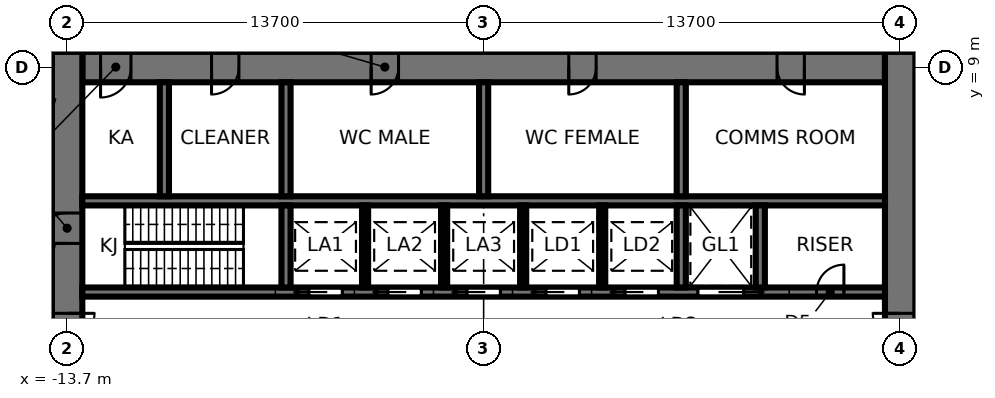
"""IFC4 building model, lengths in metres.
Left out: names, types, materials, properties, quantities, classifications, styles, units other than length and angle.
Written with IfcOpenShell. Run it as: python <this file> out.ifc"""

import sys

from ifc_helpers import new_model, si_unit, direction, frame, frame_2d, origin, place, context, subcontext, project, spatial, rectangle, extrude, element, fill, save


model = new_model("IFC4")
c1 = context("Model", 3, precision=1e-05, world=origin(), true_north=direction((0.0, 1.0)))
c2 = subcontext(c1, "Body", "Model", "MODEL_VIEW")
j1 = project(units=[si_unit("LENGTHUNIT", "METRE"), si_unit("PLANEANGLEUNIT", "RADIAN")], contexts=[c1])
p1 = place(None, origin())
s1 = spatial("IfcSite", under=j1, at=p1, CompositionType="ELEMENT")
p2 = place(p1, origin())
s2 = spatial("IfcBuilding", under=s1, at=p2, CompositionType="ELEMENT")
p3 = place(p2, origin())
s3 = spatial("IfcBuildingStorey", under=s2, at=p3, CompositionType="ELEMENT", Elevation=0.0)
p4 = place(p3, frame((13.2, 9.0, 0.0), z_axis=(0.0, 0.0, 1.0), x_axis=(-1.0, 0.0, 0.0)))
e1 = element("IfcWall", 1, at=p4, inside=s3, PredefinedType="SHEAR", context=c2, shape_type="SweptSolid", body=[
    extrude(rectangle(XDim=26.4, YDim=1.0, at=frame_2d((13.2, 0.0))), origin(), (0.0, 0.0, 1.0), 5.6),
])
p5 = place(p4, frame((2.65, 0.0, 0.0)))
e2 = element("IfcOpeningElement", 2, at=p5, cuts=e1, PredefinedType="OPENING", context=c2, shape_type="SweptSolid", body=[
    extrude(rectangle(XDim=0.9, YDim=2.1, at=frame_2d((0.45, 1.05))), frame((0.0, 0.51, 0.0), z_axis=(0.0, -1.0, 0.0), x_axis=(1.0, 0.0, 0.0)), (0.0, 0.0, 1.0), 1.02),
])
p6 = place(p4, frame((9.5, 0.0, 0.0)))
e3 = element("IfcOpeningElement", 3, at=p6, cuts=e1, PredefinedType="OPENING", context=c2, shape_type="SweptSolid", body=[
    extrude(rectangle(XDim=0.9, YDim=2.1, at=frame_2d((0.45, 1.05))), frame((0.0, 0.51, 0.0), z_axis=(0.0, -1.0, 0.0), x_axis=(1.0, 0.0, 0.0)), (0.0, 0.0, 1.0), 1.02),
])
p7 = place(p4, frame((16.0, 0.0, 0.0)))
e4 = element("IfcOpeningElement", 4, at=p7, cuts=e1, PredefinedType="OPENING", context=c2, shape_type="SweptSolid", body=[
    extrude(rectangle(XDim=0.9, YDim=2.1, at=frame_2d((0.45, 1.05))), frame((0.0, 0.51, 0.0), z_axis=(0.0, -1.0, 0.0), x_axis=(1.0, 0.0, 0.0)), (0.0, 0.0, 1.0), 1.02),
])
p8 = place(p4, frame((21.25, 0.0, 0.0)))
e5 = element("IfcOpeningElement", 5, at=p8, cuts=e1, PredefinedType="OPENING", context=c2, shape_type="SweptSolid", body=[
    extrude(rectangle(XDim=0.9, YDim=2.1, at=frame_2d((0.45, 1.05))), frame((0.0, 0.51, 0.0), z_axis=(0.0, -1.0, 0.0), x_axis=(1.0, 0.0, 0.0)), (0.0, 0.0, 1.0), 1.02),
])
p9 = place(p4, frame((24.8, 0.0, 0.0)))
e6 = element("IfcOpeningElement", 6, at=p9, cuts=e1, PredefinedType="OPENING", context=c2, shape_type="SweptSolid", body=[
    extrude(rectangle(XDim=1.0, YDim=2.1, at=frame_2d((0.5, 1.05))), frame((0.0, 0.51, 0.0), z_axis=(0.0, -1.0, 0.0), x_axis=(1.0, 0.0, 0.0)), (0.0, 0.0, 1.0), 1.02),
])
p10 = place(p3, frame((13.7, -9.5, 0.0), z_axis=(0.0, 0.0, 1.0), x_axis=(0.0, 1.0, 0.0)))
e7 = element("IfcWall", 7, at=p10, inside=s3, PredefinedType="SHEAR", context=c2, shape_type="SweptSolid", body=[
    extrude(rectangle(XDim=19.0, YDim=1.0, at=frame_2d((9.5, 0.0))), origin(), (0.0, 0.0, 1.0), 5.6),
])
p11 = place(p10, frame((8.6, 0.0, 0.0)))
e8 = element("IfcOpeningElement", 8, at=p11, cuts=e7, PredefinedType="OPENING", context=c2, shape_type="SweptSolid", body=[
    extrude(rectangle(XDim=1.8, YDim=2.4, at=frame_2d((0.9, 1.2))), frame((0.0, 0.51, 0.0), z_axis=(0.0, -1.0, 0.0), x_axis=(1.0, 0.0, 0.0)), (0.0, 0.0, 1.0), 1.02),
])
p12 = place(p10, frame((5.6, 0.0, 0.0)))
e9 = element("IfcOpeningElement", 9, at=p12, cuts=e7, PredefinedType="OPENING", context=c2, shape_type="SweptSolid", body=[
    extrude(rectangle(XDim=1.0, YDim=2.1, at=frame_2d((0.5, 1.05))), frame((0.0, 0.51, 0.0), z_axis=(0.0, -1.0, 0.0), x_axis=(1.0, 0.0, 0.0)), (0.0, 0.0, 1.0), 1.02),
])
p13 = place(p3, frame((-13.7, 9.5, 0.0), z_axis=(0.0, 0.0, 1.0), x_axis=(0.0, -1.0, 0.0)))
e10 = element("IfcWall", 10, at=p13, inside=s3, PredefinedType="SHEAR", context=c2, shape_type="SweptSolid", body=[
    extrude(rectangle(XDim=19.0, YDim=1.0, at=frame_2d((9.5, 0.0))), origin(), (0.0, 0.0, 1.0), 5.6),
])
p14 = place(p13, frame((8.6, 0.0, 0.0)))
e11 = element("IfcOpeningElement", 11, at=p14, cuts=e10, PredefinedType="OPENING", context=c2, shape_type="SweptSolid", body=[
    extrude(rectangle(XDim=1.8, YDim=2.4, at=frame_2d((0.9, 1.2))), frame((0.0, 0.51, 0.0), z_axis=(0.0, -1.0, 0.0), x_axis=(1.0, 0.0, 0.0)), (0.0, 0.0, 1.0), 1.02),
])
p15 = place(p13, frame((5.3, 0.0, 0.0)))
e12 = element("IfcOpeningElement", 12, at=p15, cuts=e10, PredefinedType="OPENING", context=c2, shape_type="SweptSolid", body=[
    extrude(rectangle(XDim=1.0, YDim=2.1, at=frame_2d((0.5, 1.05))), frame((0.0, 0.51, 0.0), z_axis=(0.0, -1.0, 0.0), x_axis=(1.0, 0.0, 0.0)), (0.0, 0.0, 1.0), 1.02),
])
p16 = place(p3, frame((-13.2, 1.6, 0.0), z_axis=(0.0, 0.0, 1.0), x_axis=(1.0, 0.0, 0.0)))
e13 = element("IfcWall", 13, at=p16, inside=s3, PredefinedType="SHEAR", context=c2, shape_type="SweptSolid", body=[
    extrude(rectangle(XDim=26.4, YDim=0.3, at=frame_2d((13.2, 0.0))), origin(), (0.0, 0.0, 1.0), 5.6),
])
p17 = place(p16, frame((20.25, 0.0, 0.0)))
e14 = element("IfcOpeningElement", 14, at=p17, cuts=e13, PredefinedType="OPENING", context=c2, shape_type="SweptSolid", body=[
    extrude(rectangle(XDim=1.5, YDim=2.4, at=frame_2d((0.75, 1.2))), frame((0.0, 0.16, 0.0), z_axis=(0.0, -1.0, 0.0), x_axis=(1.0, 0.0, 0.0)), (0.0, 0.0, 1.0), 0.32),
])
p18 = place(p16, frame((7.45, 0.0, 0.0)))
e15 = element("IfcOpeningElement", 15, at=p18, cuts=e13, PredefinedType="OPENING", context=c2, shape_type="SweptSolid", body=[
    extrude(rectangle(XDim=1.1, YDim=2.3, at=frame_2d((0.55, 1.15))), frame((0.0, 0.16, 0.0), z_axis=(0.0, -1.0, 0.0), x_axis=(1.0, 0.0, 0.0)), (0.0, 0.0, 1.0), 0.32),
])
p19 = place(p16, frame((10.05, 0.0, 0.0)))
e16 = element("IfcOpeningElement", 16, at=p19, cuts=e13, PredefinedType="OPENING", context=c2, shape_type="SweptSolid", body=[
    extrude(rectangle(XDim=1.1, YDim=2.3, at=frame_2d((0.55, 1.15))), frame((0.0, 0.16, 0.0), z_axis=(0.0, -1.0, 0.0), x_axis=(1.0, 0.0, 0.0)), (0.0, 0.0, 1.0), 0.32),
])
p20 = place(p16, frame((12.65, 0.0, 0.0)))
e17 = element("IfcOpeningElement", 17, at=p20, cuts=e13, PredefinedType="OPENING", context=c2, shape_type="SweptSolid", body=[
    extrude(rectangle(XDim=1.1, YDim=2.3, at=frame_2d((0.55, 1.15))), frame((0.0, 0.16, 0.0), z_axis=(0.0, -1.0, 0.0), x_axis=(1.0, 0.0, 0.0)), (0.0, 0.0, 1.0), 0.32),
])
p21 = place(p16, frame((15.25, 0.0, 0.0)))
e18 = element("IfcOpeningElement", 18, at=p21, cuts=e13, PredefinedType="OPENING", context=c2, shape_type="SweptSolid", body=[
    extrude(rectangle(XDim=1.1, YDim=2.3, at=frame_2d((0.55, 1.15))), frame((0.0, 0.16, 0.0), z_axis=(0.0, -1.0, 0.0), x_axis=(1.0, 0.0, 0.0)), (0.0, 0.0, 1.0), 0.32),
])
p22 = place(p16, frame((17.85, 0.0, 0.0)))
e19 = element("IfcOpeningElement", 19, at=p22, cuts=e13, PredefinedType="OPENING", context=c2, shape_type="SweptSolid", body=[
    extrude(rectangle(XDim=1.1, YDim=2.3, at=frame_2d((0.55, 1.15))), frame((0.0, 0.16, 0.0), z_axis=(0.0, -1.0, 0.0), x_axis=(1.0, 0.0, 0.0)), (0.0, 0.0, 1.0), 0.32),
])
p23 = place(p16, frame((24.15, 0.0, 0.0)))
e20 = element("IfcOpeningElement", 20, at=p23, cuts=e13, PredefinedType="OPENING", context=c2, shape_type="SweptSolid", body=[
    extrude(rectangle(XDim=0.9, YDim=2.1, at=frame_2d((0.45, 1.05))), frame((0.0, 0.16, 0.0), z_axis=(0.0, -1.0, 0.0), x_axis=(1.0, 0.0, 0.0)), (0.0, 0.0, 1.0), 0.32),
])
p24 = place(p3, frame((-13.2, 4.6, 0.0), z_axis=(0.0, 0.0, 1.0), x_axis=(1.0, 0.0, 0.0)))
e21 = element("IfcWall", 21, at=p24, inside=s3, PredefinedType="SHEAR", context=c2, shape_type="SweptSolid", body=[
    extrude(rectangle(XDim=26.4, YDim=0.3, at=frame_2d((13.2, 0.0))), origin(), (0.0, 0.0, 1.0), 5.6),
])
p25 = place(p3, frame((-6.5, 1.75, 0.0), z_axis=(0.0, 0.0, 1.0), x_axis=(0.0, 1.0, 0.0)))
e22 = element("IfcWall", 22, at=p25, inside=s3, PredefinedType="SHEAR", context=c2, shape_type="SweptSolid", body=[
    extrude(rectangle(XDim=2.7, YDim=0.3, at=frame_2d((1.35, 0.0))), origin(), (0.0, 0.0, 1.0), 5.6),
])
p26 = place(p3, frame((-6.5, 4.75, 0.0), z_axis=(0.0, 0.0, 1.0), x_axis=(0.0, 1.0, 0.0)))
e23 = element("IfcWall", 23, at=p26, inside=s3, PredefinedType="SHEAR", context=c2, shape_type="SweptSolid", body=[
    extrude(rectangle(XDim=3.75, YDim=0.3, at=frame_2d((1.875, 0.0))), origin(), (0.0, 0.0, 1.0), 5.6),
])
p27 = place(p3, frame((6.5, 1.75, 0.0), z_axis=(0.0, 0.0, 1.0), x_axis=(0.0, 1.0, 0.0)))
e24 = element("IfcWall", 24, at=p27, inside=s3, PredefinedType="SHEAR", context=c2, shape_type="SweptSolid", body=[
    extrude(rectangle(XDim=2.7, YDim=0.3, at=frame_2d((1.35, 0.0))), origin(), (0.0, 0.0, 1.0), 5.6),
])
p28 = place(p3, frame((6.5, 4.75, 0.0), z_axis=(0.0, 0.0, 1.0), x_axis=(0.0, 1.0, 0.0)))
e25 = element("IfcWall", 25, at=p28, inside=s3, PredefinedType="SHEAR", context=c2, shape_type="SweptSolid", body=[
    extrude(rectangle(XDim=3.75, YDim=0.3, at=frame_2d((1.875, 0.0))), origin(), (0.0, 0.0, 1.0), 5.6),
])
for number, where, z_axis, x_axis in (
    (26, (-3.9, 1.75, 0.0), (0.0, 0.0, 1.0), (0.0, 1.0, 0.0)),
    (27, (-1.3, 1.75, 0.0), (0.0, 0.0, 1.0), (0.0, 1.0, 0.0)),
    (28, (1.3, 1.75, 0.0), (0.0, 0.0, 1.0), (0.0, 1.0, 0.0)),
    (29, (3.9, 1.75, 0.0), (0.0, 0.0, 1.0), (0.0, 1.0, 0.0)),
):
    element("IfcWall", number, at=place(p3, frame(where, z_axis=z_axis, x_axis=x_axis)), inside=s3, PredefinedType="SHEAR", context=c2, shape_type="SweptSolid", body=[
        extrude(rectangle(XDim=2.7, YDim=0.2, at=frame_2d((1.35, 0.0))), origin(), (0.0, 0.0, 1.0), 5.6),
    ])
for number, where, z_axis, x_axis in (
    (30, (0.0, 4.75, 0.0), (0.0, 0.0, 1.0), (0.0, 1.0, 0.0)),
    (31, (-10.5, 4.75, 0.0), (0.0, 0.0, 1.0), (0.0, 1.0, 0.0)),
):
    element("IfcWall", number, at=place(p3, frame(where, z_axis=z_axis, x_axis=x_axis)), inside=s3, PredefinedType="SHEAR", context=c2, shape_type="SweptSolid", body=[
        extrude(rectangle(XDim=3.75, YDim=0.3, at=frame_2d((1.875, 0.0))), origin(), (0.0, 0.0, 1.0), 5.6),
    ])
p29 = place(p3, frame((9.1, 1.75, 0.0), z_axis=(0.0, 0.0, 1.0), x_axis=(0.0, 1.0, 0.0)))
e32 = element("IfcWall", 32, at=p29, inside=s3, PredefinedType="SHEAR", context=c2, shape_type="SweptSolid", body=[
    extrude(rectangle(XDim=2.7, YDim=0.3, at=frame_2d((1.35, 0.0))), origin(), (0.0, 0.0, 1.0), 5.6),
])
p30 = place(p3, frame((-14.2, 7.8, 0.0), z_axis=(0.0, 0.0, 1.0), x_axis=(-0.961010848489, 0.27651066722, 0.0)))
e33 = element("IfcWall", 33, at=p30, inside=s3, PredefinedType="SOLIDWALL", context=c2, shape_type="SweptSolid", body=[
    extrude(rectangle(XDim=9.763, YDim=0.19, at=frame_2d((4.882, 0.0))), origin(), (0.0, 0.0, 1.0), 5.4),
])
p31 = place(p3, frame((-42.512, 9.036, 0.0), z_axis=(0.0, 0.0, 1.0), x_axis=(0.978148538657, -0.207907278186, 0.0)))
e34 = element("IfcWall", 34, at=p31, inside=s3, PredefinedType="SOLIDWALL", context=c2, shape_type="SweptSolid", body=[
    extrude(rectangle(XDim=28.945, YDim=0.19, at=frame_2d((14.472, 0.0))), origin(), (0.0, 0.0, 1.0), 5.4),
])
p32 = place(p31, frame((8.116, 0.0, 0.0)))
e35 = element("IfcOpeningElement", 35, at=p32, cuts=e34, PredefinedType="OPENING", context=c2, shape_type="SweptSolid", body=[
    extrude(rectangle(XDim=1.0, YDim=2.1, at=frame_2d((0.5, 1.05))), frame((0.0, 0.105, 0.0), z_axis=(0.0, -1.0, 0.0), x_axis=(1.0, 0.0, 0.0)), (0.0, 0.0, 1.0), 0.21),
])
p33 = place(p14, origin())
e36 = element("IfcDoor", 36, at=p33, inside=s3, OperationType="DOUBLE_DOOR_SINGLE_SWING", PredefinedType="DOOR", context=c2, shape_type="SweptSolid", body=[
    extrude(rectangle(XDim=1.72, YDim=2.36, at=frame_2d((0.9, 1.18))), frame((0.0, 0.025, 0.0), z_axis=(0.0, -1.0, 0.0), x_axis=(1.0, 0.0, 0.0)), (0.0, 0.0, 1.0), 0.05),
    extrude(rectangle(XDim=0.04, YDim=2.4, at=frame_2d((0.02, 1.2))), frame((0.0, 0.25, 0.0), z_axis=(0.0, -1.0, 0.0), x_axis=(1.0, 0.0, 0.0)), (0.0, 0.0, 1.0), 0.5),
    extrude(rectangle(XDim=0.04, YDim=2.4, at=frame_2d((1.78, 1.2))), frame((0.0, 0.25, 0.0), z_axis=(0.0, -1.0, 0.0), x_axis=(1.0, 0.0, 0.0)), (0.0, 0.0, 1.0), 0.5),
    extrude(rectangle(XDim=1.72, YDim=0.04, at=frame_2d((0.9, 2.38))), frame((0.0, 0.25, 0.0), z_axis=(0.0, -1.0, 0.0), x_axis=(1.0, 0.0, 0.0)), (0.0, 0.0, 1.0), 0.5),
])
fill(e11, e36)
p34 = place(p11, origin())
e37 = element("IfcDoor", 37, at=p34, inside=s3, OperationType="DOUBLE_DOOR_SINGLE_SWING", PredefinedType="DOOR", context=c2, shape_type="SweptSolid", body=[
    extrude(rectangle(XDim=1.72, YDim=2.36, at=frame_2d((0.9, 1.18))), frame((0.0, 0.025, 0.0), z_axis=(0.0, -1.0, 0.0), x_axis=(1.0, 0.0, 0.0)), (0.0, 0.0, 1.0), 0.05),
    extrude(rectangle(XDim=0.04, YDim=2.4, at=frame_2d((0.02, 1.2))), frame((0.0, 0.25, 0.0), z_axis=(0.0, -1.0, 0.0), x_axis=(1.0, 0.0, 0.0)), (0.0, 0.0, 1.0), 0.5),
    extrude(rectangle(XDim=0.04, YDim=2.4, at=frame_2d((1.78, 1.2))), frame((0.0, 0.25, 0.0), z_axis=(0.0, -1.0, 0.0), x_axis=(1.0, 0.0, 0.0)), (0.0, 0.0, 1.0), 0.5),
    extrude(rectangle(XDim=1.72, YDim=0.04, at=frame_2d((0.9, 2.38))), frame((0.0, 0.25, 0.0), z_axis=(0.0, -1.0, 0.0), x_axis=(1.0, 0.0, 0.0)), (0.0, 0.0, 1.0), 0.5),
])
fill(e8, e37)
p35 = place(p15, frame((1.0, 0.0, 0.0), z_axis=(0.0, 0.0, 1.0), x_axis=(-1.0, 0.0, 0.0)))
e38 = element("IfcDoor", 38, at=p35, inside=s3, OperationType="SINGLE_SWING_LEFT", PredefinedType="DOOR", context=c2, shape_type="SweptSolid", body=[
    extrude(rectangle(XDim=0.92, YDim=2.06, at=frame_2d((0.5, 1.03))), frame((0.0, 0.025, 0.0), z_axis=(0.0, -1.0, 0.0), x_axis=(1.0, 0.0, 0.0)), (0.0, 0.0, 1.0), 0.05),
    extrude(rectangle(XDim=0.04, YDim=2.1, at=frame_2d((0.98, 1.05))), frame((0.0, 0.25, 0.0), z_axis=(0.0, -1.0, 0.0), x_axis=(1.0, 0.0, 0.0)), (0.0, 0.0, 1.0), 0.5),
    extrude(rectangle(XDim=0.04, YDim=2.1, at=frame_2d((0.02, 1.05))), frame((0.0, 0.25, 0.0), z_axis=(0.0, -1.0, 0.0), x_axis=(1.0, 0.0, 0.0)), (0.0, 0.0, 1.0), 0.5),
    extrude(rectangle(XDim=0.92, YDim=0.04, at=frame_2d((0.5, 2.08))), frame((0.0, 0.25, 0.0), z_axis=(0.0, -1.0, 0.0), x_axis=(1.0, 0.0, 0.0)), (0.0, 0.0, 1.0), 0.5),
])
fill(e12, e38)
p36 = place(p17, origin())
e39 = element("IfcDoor", 39, at=p36, inside=s3, OperationType="SLIDING_TO_RIGHT", PredefinedType="DOOR", context=c2, shape_type="SweptSolid", body=[
    extrude(rectangle(XDim=1.5, YDim=2.4, at=frame_2d((0.75, 1.2))), frame((0.0, 0.025, 0.0), z_axis=(0.0, -1.0, 0.0), x_axis=(1.0, 0.0, 0.0)), (0.0, 0.0, 1.0), 0.05),
])
fill(e14, e39)
p37 = place(p18, origin())
e40 = element("IfcDoor", 40, at=p37, inside=s3, OperationType="SLIDING_TO_LEFT", PredefinedType="DOOR", context=c2, shape_type="SweptSolid", body=[
    extrude(rectangle(XDim=1.1, YDim=2.3, at=frame_2d((0.55, 1.15))), frame((0.0, 0.025, 0.0), z_axis=(0.0, -1.0, 0.0), x_axis=(1.0, 0.0, 0.0)), (0.0, 0.0, 1.0), 0.05),
])
fill(e15, e40)
p38 = place(p19, origin())
e41 = element("IfcDoor", 41, at=p38, inside=s3, OperationType="SLIDING_TO_LEFT", PredefinedType="DOOR", context=c2, shape_type="SweptSolid", body=[
    extrude(rectangle(XDim=1.1, YDim=2.3, at=frame_2d((0.55, 1.15))), frame((0.0, 0.025, 0.0), z_axis=(0.0, -1.0, 0.0), x_axis=(1.0, 0.0, 0.0)), (0.0, 0.0, 1.0), 0.05),
])
fill(e16, e41)
p39 = place(p20, origin())
e42 = element("IfcDoor", 42, at=p39, inside=s3, OperationType="SLIDING_TO_LEFT", PredefinedType="DOOR", context=c2, shape_type="SweptSolid", body=[
    extrude(rectangle(XDim=1.1, YDim=2.3, at=frame_2d((0.55, 1.15))), frame((0.0, 0.025, 0.0), z_axis=(0.0, -1.0, 0.0), x_axis=(1.0, 0.0, 0.0)), (0.0, 0.0, 1.0), 0.05),
])
fill(e17, e42)
p40 = place(p21, origin())
e43 = element("IfcDoor", 43, at=p40, inside=s3, OperationType="SLIDING_TO_LEFT", PredefinedType="DOOR", context=c2, shape_type="SweptSolid", body=[
    extrude(rectangle(XDim=1.1, YDim=2.3, at=frame_2d((0.55, 1.15))), frame((0.0, 0.025, 0.0), z_axis=(0.0, -1.0, 0.0), x_axis=(1.0, 0.0, 0.0)), (0.0, 0.0, 1.0), 0.05),
])
fill(e18, e43)
p41 = place(p22, origin())
e44 = element("IfcDoor", 44, at=p41, inside=s3, OperationType="SLIDING_TO_LEFT", PredefinedType="DOOR", context=c2, shape_type="SweptSolid", body=[
    extrude(rectangle(XDim=1.1, YDim=2.3, at=frame_2d((0.55, 1.15))), frame((0.0, 0.025, 0.0), z_axis=(0.0, -1.0, 0.0), x_axis=(1.0, 0.0, 0.0)), (0.0, 0.0, 1.0), 0.05),
])
fill(e19, e44)
p42 = place(p23, origin())
e45 = element("IfcDoor", 45, at=p42, inside=s3, OperationType="SINGLE_SWING_RIGHT", PredefinedType="DOOR", context=c2, shape_type="SweptSolid", body=[
    extrude(rectangle(XDim=0.9, YDim=2.1, at=frame_2d((0.45, 1.05))), frame((0.0, 0.025, 0.0), z_axis=(0.0, -1.0, 0.0), x_axis=(1.0, 0.0, 0.0)), (0.0, 0.0, 1.0), 0.05),
])
fill(e20, e45)
p43 = place(p5, origin())
e46 = element("IfcDoor", 46, at=p43, inside=s3, OperationType="SINGLE_SWING_LEFT", PredefinedType="DOOR", context=c2, shape_type="SweptSolid", body=[
    extrude(rectangle(XDim=0.82, YDim=2.06, at=frame_2d((0.45, 1.03))), frame((0.0, 0.025, 0.0), z_axis=(0.0, -1.0, 0.0), x_axis=(1.0, 0.0, 0.0)), (0.0, 0.0, 1.0), 0.05),
    extrude(rectangle(XDim=0.04, YDim=2.1, at=frame_2d((0.02, 1.05))), frame((0.0, 0.25, 0.0), z_axis=(0.0, -1.0, 0.0), x_axis=(1.0, 0.0, 0.0)), (0.0, 0.0, 1.0), 0.5),
    extrude(rectangle(XDim=0.04, YDim=2.1, at=frame_2d((0.88, 1.05))), frame((0.0, 0.25, 0.0), z_axis=(0.0, -1.0, 0.0), x_axis=(1.0, 0.0, 0.0)), (0.0, 0.0, 1.0), 0.5),
    extrude(rectangle(XDim=0.82, YDim=0.04, at=frame_2d((0.45, 2.08))), frame((0.0, 0.25, 0.0), z_axis=(0.0, -1.0, 0.0), x_axis=(1.0, 0.0, 0.0)), (0.0, 0.0, 1.0), 0.5),
])
fill(e2, e46)
p44 = place(p6, origin())
e47 = element("IfcDoor", 47, at=p44, inside=s3, OperationType="SINGLE_SWING_RIGHT", PredefinedType="DOOR", context=c2, shape_type="SweptSolid", body=[
    extrude(rectangle(XDim=0.82, YDim=2.06, at=frame_2d((0.45, 1.03))), frame((0.0, 0.025, 0.0), z_axis=(0.0, -1.0, 0.0), x_axis=(1.0, 0.0, 0.0)), (0.0, 0.0, 1.0), 0.05),
    extrude(rectangle(XDim=0.04, YDim=2.1, at=frame_2d((0.02, 1.05))), frame((0.0, 0.25, 0.0), z_axis=(0.0, -1.0, 0.0), x_axis=(1.0, 0.0, 0.0)), (0.0, 0.0, 1.0), 0.5),
    extrude(rectangle(XDim=0.04, YDim=2.1, at=frame_2d((0.88, 1.05))), frame((0.0, 0.25, 0.0), z_axis=(0.0, -1.0, 0.0), x_axis=(1.0, 0.0, 0.0)), (0.0, 0.0, 1.0), 0.5),
    extrude(rectangle(XDim=0.82, YDim=0.04, at=frame_2d((0.45, 2.08))), frame((0.0, 0.25, 0.0), z_axis=(0.0, -1.0, 0.0), x_axis=(1.0, 0.0, 0.0)), (0.0, 0.0, 1.0), 0.5),
])
fill(e3, e47)
p45 = place(p7, origin())
e48 = element("IfcDoor", 48, at=p45, inside=s3, OperationType="SINGLE_SWING_RIGHT", PredefinedType="DOOR", context=c2, shape_type="SweptSolid", body=[
    extrude(rectangle(XDim=0.82, YDim=2.06, at=frame_2d((0.45, 1.03))), frame((0.0, 0.025, 0.0), z_axis=(0.0, -1.0, 0.0), x_axis=(1.0, 0.0, 0.0)), (0.0, 0.0, 1.0), 0.05),
    extrude(rectangle(XDim=0.04, YDim=2.1, at=frame_2d((0.02, 1.05))), frame((0.0, 0.25, 0.0), z_axis=(0.0, -1.0, 0.0), x_axis=(1.0, 0.0, 0.0)), (0.0, 0.0, 1.0), 0.5),
    extrude(rectangle(XDim=0.04, YDim=2.1, at=frame_2d((0.88, 1.05))), frame((0.0, 0.25, 0.0), z_axis=(0.0, -1.0, 0.0), x_axis=(1.0, 0.0, 0.0)), (0.0, 0.0, 1.0), 0.5),
    extrude(rectangle(XDim=0.82, YDim=0.04, at=frame_2d((0.45, 2.08))), frame((0.0, 0.25, 0.0), z_axis=(0.0, -1.0, 0.0), x_axis=(1.0, 0.0, 0.0)), (0.0, 0.0, 1.0), 0.5),
])
fill(e4, e48)
p46 = place(p8, origin())
e49 = element("IfcDoor", 49, at=p46, inside=s3, OperationType="SINGLE_SWING_RIGHT", PredefinedType="DOOR", context=c2, shape_type="SweptSolid", body=[
    extrude(rectangle(XDim=0.82, YDim=2.06, at=frame_2d((0.45, 1.03))), frame((0.0, 0.025, 0.0), z_axis=(0.0, -1.0, 0.0), x_axis=(1.0, 0.0, 0.0)), (0.0, 0.0, 1.0), 0.05),
    extrude(rectangle(XDim=0.04, YDim=2.1, at=frame_2d((0.02, 1.05))), frame((0.0, 0.25, 0.0), z_axis=(0.0, -1.0, 0.0), x_axis=(1.0, 0.0, 0.0)), (0.0, 0.0, 1.0), 0.5),
    extrude(rectangle(XDim=0.04, YDim=2.1, at=frame_2d((0.88, 1.05))), frame((0.0, 0.25, 0.0), z_axis=(0.0, -1.0, 0.0), x_axis=(1.0, 0.0, 0.0)), (0.0, 0.0, 1.0), 0.5),
    extrude(rectangle(XDim=0.82, YDim=0.04, at=frame_2d((0.45, 2.08))), frame((0.0, 0.25, 0.0), z_axis=(0.0, -1.0, 0.0), x_axis=(1.0, 0.0, 0.0)), (0.0, 0.0, 1.0), 0.5),
])
fill(e5, e49)
p47 = place(p9, origin())
e50 = element("IfcDoor", 50, at=p47, inside=s3, OperationType="SINGLE_SWING_RIGHT", PredefinedType="DOOR", context=c2, shape_type="SweptSolid", body=[
    extrude(rectangle(XDim=0.92, YDim=2.06, at=frame_2d((0.5, 1.03))), frame((0.0, 0.025, 0.0), z_axis=(0.0, -1.0, 0.0), x_axis=(1.0, 0.0, 0.0)), (0.0, 0.0, 1.0), 0.05),
    extrude(rectangle(XDim=0.04, YDim=2.1, at=frame_2d((0.02, 1.05))), frame((0.0, 0.25, 0.0), z_axis=(0.0, -1.0, 0.0), x_axis=(1.0, 0.0, 0.0)), (0.0, 0.0, 1.0), 0.5),
    extrude(rectangle(XDim=0.04, YDim=2.1, at=frame_2d((0.98, 1.05))), frame((0.0, 0.25, 0.0), z_axis=(0.0, -1.0, 0.0), x_axis=(1.0, 0.0, 0.0)), (0.0, 0.0, 1.0), 0.5),
    extrude(rectangle(XDim=0.92, YDim=0.04, at=frame_2d((0.5, 2.08))), frame((0.0, 0.25, 0.0), z_axis=(0.0, -1.0, 0.0), x_axis=(1.0, 0.0, 0.0)), (0.0, 0.0, 1.0), 0.5),
])
fill(e6, e50)
save(model, sys.argv[1])
